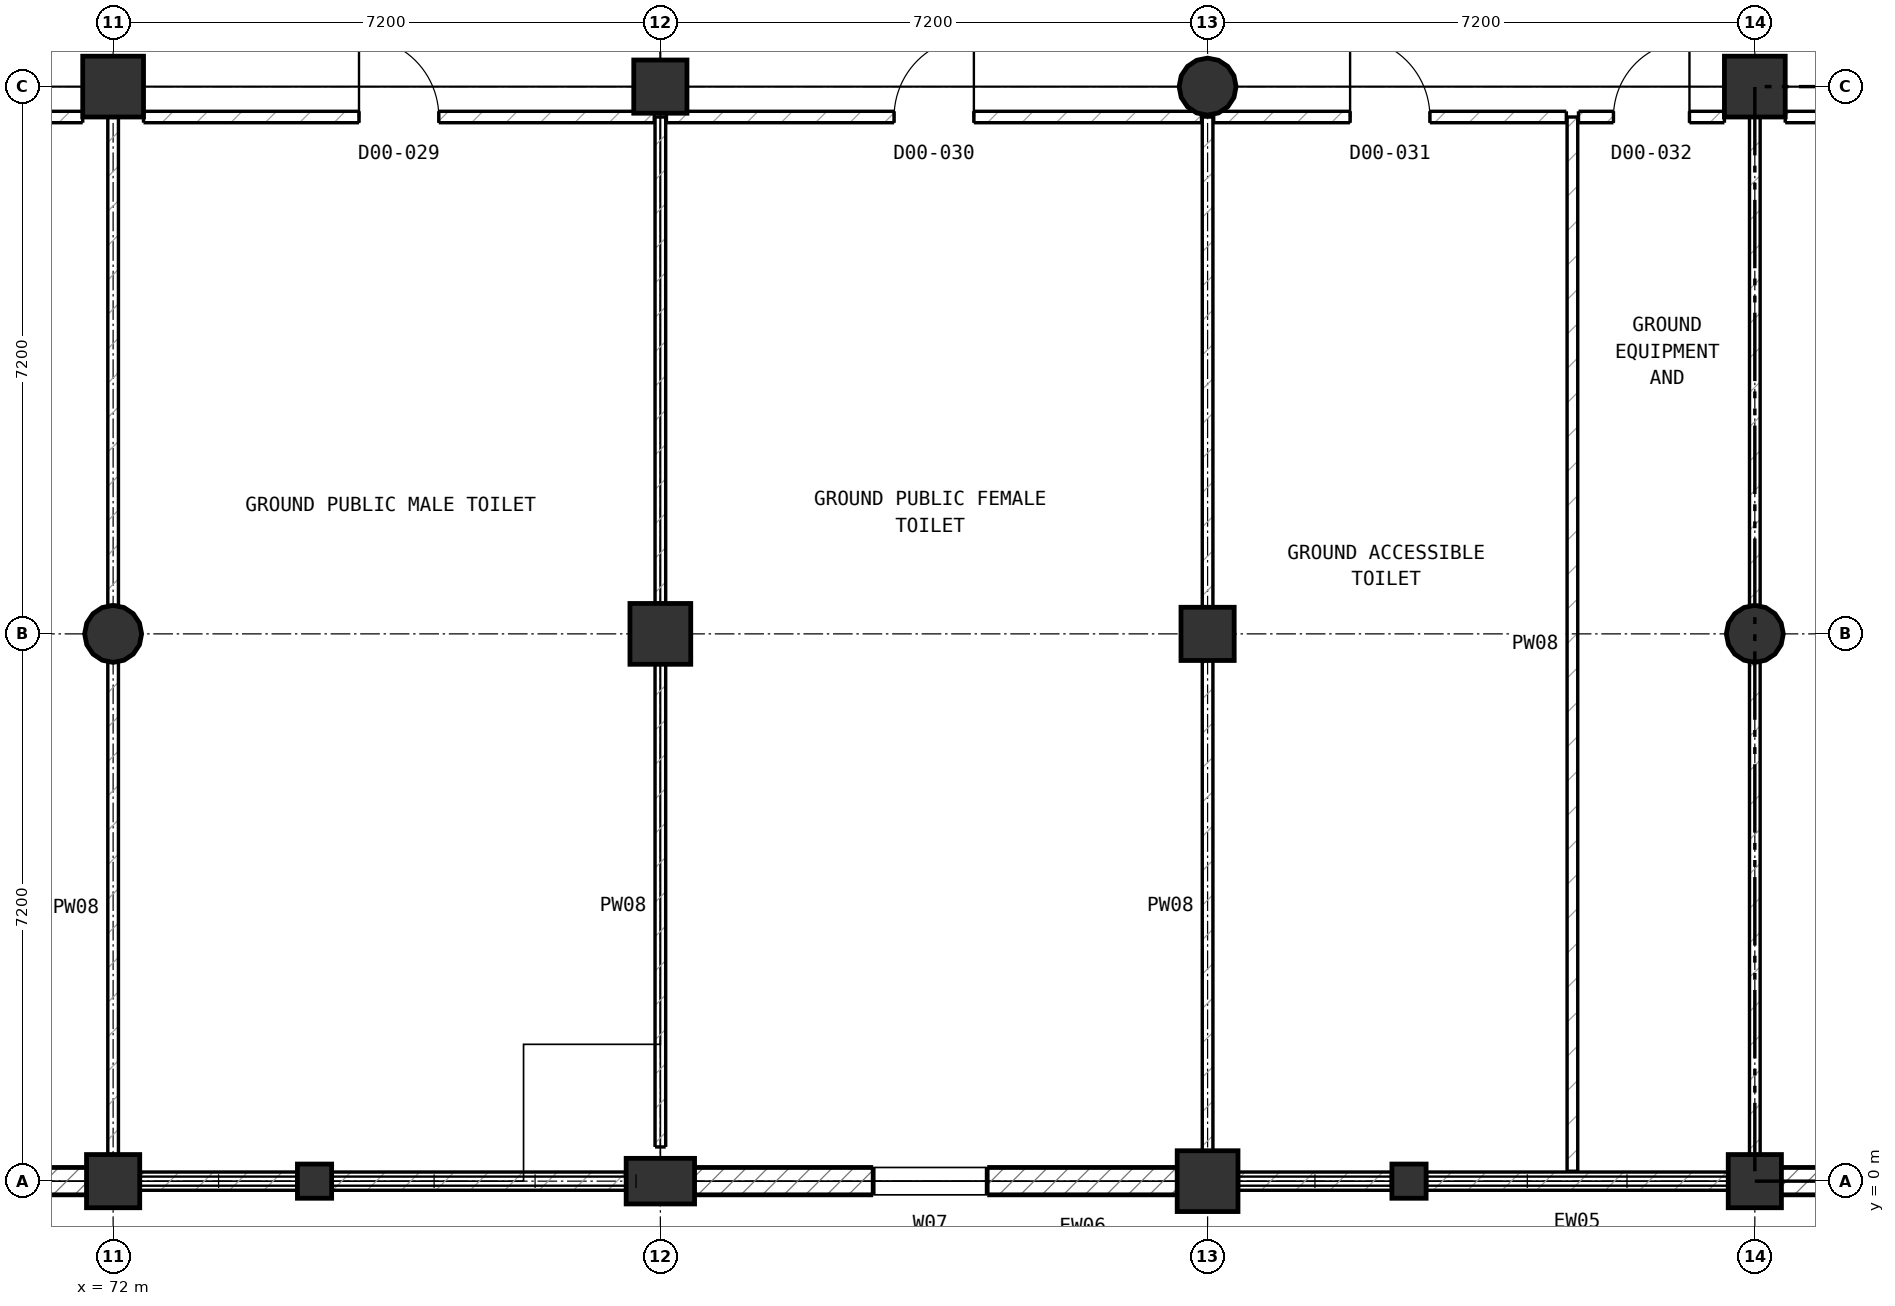
"""IFC4 building model, lengths in metres.
Left out: names, types, materials, properties, quantities, classifications, styles, units other than length and angle.
Written with IfcOpenShell. Run it as: python <this file> out.ifc"""

import sys

from ifc_helpers import new_model, si_unit, direction, frame, frame_2d, origin, origin_2d, place, context, subcontext, project, spatial, rectangle, circle, extrude, element, fill, save


model = new_model("IFC4")
c1 = context("Model", 3, precision=1e-05, world=origin(), true_north=direction((0.0, 1.0)))
c2 = subcontext(c1, "Body", "Model", "MODEL_VIEW")
j1 = project(units=[si_unit("LENGTHUNIT", "METRE"), si_unit("PLANEANGLEUNIT", "RADIAN")], contexts=[c1])
p1 = place(None, origin())
s1 = spatial("IfcSite", under=j1, at=p1, CompositionType="ELEMENT")
p2 = place(p1, origin())
s2 = spatial("IfcBuilding", under=s1, at=p2, CompositionType="ELEMENT")
p3 = place(p2, origin())
s3 = spatial("IfcBuildingStorey", under=s2, at=p3, CompositionType="ELEMENT", Elevation=0.0)
p4 = place(p3, frame((72.0, 0.0, 0.0), z_axis=(0.0, 0.0, 1.0), x_axis=(1.0, 0.0, 0.0)))
e1 = element("IfcColumn", 1, at=p4, inside=s3, PredefinedType="COLUMN", context=c2, shape_type="SweptSolid", body=[
    extrude(rectangle(XDim=0.7, YDim=0.7, at=origin_2d()), origin(), (0.0, 0.0, 1.0), 5.6),
])
p5 = place(p3, frame((72.0, 7.2, 0.0), z_axis=(0.0, 0.0, 1.0), x_axis=(1.0, 0.0, 0.0)))
e2 = element("IfcColumn", 2, at=p5, inside=s3, PredefinedType="COLUMN", context=c2, shape_type="SweptSolid", body=[
    extrude(circle(Radius=0.375, at=origin_2d()), origin(), (0.0, 0.0, 1.0), 5.6),
])
p6 = place(p3, frame((72.0, 14.4, 0.0), z_axis=(0.0, 0.0, 1.0), x_axis=(1.0, 0.0, 0.0)))
e3 = element("IfcColumn", 3, at=p6, inside=s3, PredefinedType="COLUMN", context=c2, shape_type="SweptSolid", body=[
    extrude(rectangle(XDim=0.8, YDim=0.8, at=origin_2d()), origin(), (0.0, 0.0, 1.0), 5.6),
])
p7 = place(p3, frame((79.2, 0.0, 0.0), z_axis=(0.0, 0.0, 1.0), x_axis=(1.0, 0.0, 0.0)))
e4 = element("IfcColumn", 4, at=p7, inside=s3, PredefinedType="COLUMN", context=c2, shape_type="SweptSolid", body=[
    extrude(rectangle(XDim=0.6, YDim=0.9, at=origin_2d()), origin(), (0.0, 0.0, 1.0), 5.6),
])
p8 = place(p3, frame((79.2, 7.2, 0.0), z_axis=(0.0, 0.0, 1.0), x_axis=(1.0, 0.0, 0.0)))
e5 = element("IfcColumn", 5, at=p8, inside=s3, PredefinedType="COLUMN", context=c2, shape_type="SweptSolid", body=[
    extrude(rectangle(XDim=0.8, YDim=0.8, at=origin_2d()), origin(), (0.0, 0.0, 1.0), 5.6),
])
p9 = place(p3, frame((79.2, 14.4, 0.0), z_axis=(0.0, 0.0, 1.0), x_axis=(1.0, 0.0, 0.0)))
e6 = element("IfcColumn", 6, at=p9, inside=s3, PredefinedType="COLUMN", context=c2, shape_type="SweptSolid", body=[
    extrude(rectangle(XDim=0.7, YDim=0.7, at=origin_2d()), origin(), (0.0, 0.0, 1.0), 5.6),
])
p10 = place(p3, frame((86.4, 0.0, 0.0), z_axis=(0.0, 0.0, 1.0), x_axis=(1.0, 0.0, 0.0)))
e7 = element("IfcColumn", 7, at=p10, inside=s3, PredefinedType="COLUMN", context=c2, shape_type="SweptSolid", body=[
    extrude(rectangle(XDim=0.8, YDim=0.8, at=origin_2d()), origin(), (0.0, 0.0, 1.0), 5.6),
])
p11 = place(p3, frame((86.4, 7.2, 0.0), z_axis=(0.0, 0.0, 1.0), x_axis=(1.0, 0.0, 0.0)))
e8 = element("IfcColumn", 8, at=p11, inside=s3, PredefinedType="COLUMN", context=c2, shape_type="SweptSolid", body=[
    extrude(rectangle(XDim=0.7, YDim=0.7, at=origin_2d()), origin(), (0.0, 0.0, 1.0), 5.6),
])
p12 = place(p3, frame((86.4, 14.4, 0.0), z_axis=(0.0, 0.0, 1.0), x_axis=(1.0, 0.0, 0.0)))
e9 = element("IfcColumn", 9, at=p12, inside=s3, PredefinedType="COLUMN", context=c2, shape_type="SweptSolid", body=[
    extrude(circle(Radius=0.375, at=origin_2d()), origin(), (0.0, 0.0, 1.0), 5.6),
])
p13 = place(p3, frame((93.6, 0.0, 0.0), z_axis=(0.0, 0.0, 1.0), x_axis=(1.0, 0.0, 0.0)))
e10 = element("IfcColumn", 10, at=p13, inside=s3, PredefinedType="COLUMN", context=c2, shape_type="SweptSolid", body=[
    extrude(rectangle(XDim=0.7, YDim=0.7, at=origin_2d()), origin(), (0.0, 0.0, 1.0), 5.6),
])
p14 = place(p3, frame((93.6, 7.2, 0.0), z_axis=(0.0, 0.0, 1.0), x_axis=(1.0, 0.0, 0.0)))
e11 = element("IfcColumn", 11, at=p14, inside=s3, PredefinedType="COLUMN", context=c2, shape_type="SweptSolid", body=[
    extrude(circle(Radius=0.375, at=origin_2d()), origin(), (0.0, 0.0, 1.0), 5.6),
])
p15 = place(p3, frame((93.6, 14.4, 0.0), z_axis=(0.0, 0.0, 1.0), x_axis=(1.0, 0.0, 0.0)))
e12 = element("IfcColumn", 12, at=p15, inside=s3, PredefinedType="COLUMN", context=c2, shape_type="SweptSolid", body=[
    extrude(rectangle(XDim=0.8, YDim=0.8, at=origin_2d()), origin(), (0.0, 0.0, 1.0), 5.6),
])
for number, where, z_axis, x_axis in (
    (13, (74.65, 0.0, 0.0), (0.0, 0.0, 1.0), (1.0, 0.0, 0.0)),
    (14, (89.05, 0.0, 0.0), (0.0, 0.0, 1.0), (1.0, 0.0, 0.0)),
):
    element("IfcColumn", number, at=place(p3, frame(where, z_axis=z_axis, x_axis=x_axis)), inside=s3, PredefinedType="PILASTER", context=c2, shape_type="SweptSolid", body=[
        extrude(rectangle(XDim=0.45, YDim=0.45, at=origin_2d()), origin(), (0.0, 0.0, 1.0), 5.6),
    ])
p16 = place(p3, frame((100.515, 0.0, 0.0), z_axis=(0.0, 0.0, 1.0), x_axis=(-1.0, 0.0, 0.0)))
e15 = element("IfcWall", 15, at=p16, inside=s3, PredefinedType="SOLIDWALL", context=c2, shape_type="SweptSolid", body=[
    extrude(rectangle(XDim=6.58, YDim=0.36, at=frame_2d((3.29, 0.0))), origin(), (0.0, 0.0, 1.0), 5.6),
])
p17 = place(p16, frame((2.315, 0.0, 0.0)))
e16 = element("IfcOpeningElement", 16, at=p17, cuts=e15, PredefinedType="OPENING", context=c2, shape_type="SweptSolid", body=[
    extrude(rectangle(XDim=1.95, YDim=2.2, at=frame_2d((0.975, 1.1))), frame((0.0, 0.19, 0.0), z_axis=(0.0, -1.0, 0.0), x_axis=(1.0, 0.0, 0.0)), (0.0, 0.0, 1.0), 0.38),
])
p18 = place(p3, frame((93.265, 0.0, 0.0), z_axis=(0.0, 0.0, 1.0), x_axis=(-1.0, 0.0, 0.0)))
e17 = element("IfcWall", 17, at=p18, inside=s3, PredefinedType="SOLIDWALL", context=c2, shape_type="SweptSolid", body=[
    extrude(rectangle(XDim=4.005, YDim=0.24, at=frame_2d((2.002, 0.0))), origin(), (0.0, 0.0, 1.0), 0.35),
])
p19 = place(p3, frame((88.84, 0.0, 0.0), z_axis=(0.0, 0.0, 1.0), x_axis=(-1.0, 0.0, 0.0)))
e18 = element("IfcWall", 18, at=p19, inside=s3, PredefinedType="SOLIDWALL", context=c2, shape_type="SweptSolid", body=[
    extrude(rectangle(XDim=2.055, YDim=0.24, at=frame_2d((1.028, 0.0))), origin(), (0.0, 0.0, 1.0), 0.35),
])
p20 = place(p3, frame((86.015, 0.0, 0.0), z_axis=(0.0, 0.0, 1.0), x_axis=(-1.0, 0.0, 0.0)))
e19 = element("IfcWall", 19, at=p20, inside=s3, PredefinedType="SOLIDWALL", context=c2, shape_type="SweptSolid", body=[
    extrude(rectangle(XDim=6.53, YDim=0.36, at=frame_2d((3.265, 0.0))), origin(), (0.0, 0.0, 1.0), 5.6),
])
p21 = place(p20, frame((2.515, 0.0, 0.9)))
e20 = element("IfcOpeningElement", 20, at=p21, cuts=e19, PredefinedType="OPENING", context=c2, shape_type="SweptSolid", body=[
    extrude(rectangle(XDim=1.5, YDim=2.7, at=frame_2d((0.75, 1.35))), frame((0.0, 0.19, 0.0), z_axis=(0.0, -1.0, 0.0), x_axis=(1.0, 0.0, 0.0)), (0.0, 0.0, 1.0), 0.38),
])
p22 = place(p3, frame((78.915, 0.0, 0.0), z_axis=(0.0, 0.0, 1.0), x_axis=(-1.0, 0.0, 0.0)))
e21 = element("IfcWall", 21, at=p22, inside=s3, PredefinedType="SOLIDWALL", context=c2, shape_type="SweptSolid", body=[
    extrude(rectangle(XDim=4.055, YDim=0.24, at=frame_2d((2.027, 0.0))), origin(), (0.0, 0.0, 1.0), 0.35),
])
p23 = place(p3, frame((74.44, 0.0, 0.0), z_axis=(0.0, 0.0, 1.0), x_axis=(-1.0, 0.0, 0.0)))
e22 = element("IfcWall", 22, at=p23, inside=s3, PredefinedType="SOLIDWALL", context=c2, shape_type="SweptSolid", body=[
    extrude(rectangle(XDim=2.105, YDim=0.24, at=frame_2d((1.052, 0.0))), origin(), (0.0, 0.0, 1.0), 0.35),
])
p24 = place(p3, frame((71.665, 0.0, 0.0), z_axis=(0.0, 0.0, 1.0), x_axis=(-1.0, 0.0, 0.0)))
e23 = element("IfcWall", 23, at=p24, inside=s3, PredefinedType="SOLIDWALL", context=c2, shape_type="SweptSolid", body=[
    extrude(rectangle(XDim=6.48, YDim=0.36, at=frame_2d((3.24, 0.0))), origin(), (0.0, 0.0, 1.0), 5.6),
])
p25 = place(p24, frame((2.24, 0.0, 2.1)))
e24 = element("IfcOpeningElement", 24, at=p25, cuts=e23, PredefinedType="OPENING", context=c2, shape_type="SweptSolid", body=[
    extrude(rectangle(XDim=2.0, YDim=0.9, at=frame_2d((1.0, 0.45))), frame((0.0, 0.19, 0.0), z_axis=(0.0, -1.0, 0.0), x_axis=(1.0, 0.0, 0.0)), (0.0, 0.0, 1.0), 0.38),
])
p26 = place(p3, frame((72.0, 0.35, 0.0), z_axis=(0.0, 0.0, 1.0), x_axis=(0.0, 1.0, 0.0)))
e25 = element("IfcWall", 25, at=p26, inside=s3, PredefinedType="PARTITIONING", context=c2, shape_type="SweptSolid", body=[
    extrude(rectangle(XDim=6.475, YDim=0.14, at=frame_2d((3.237, 0.0))), origin(), (0.0, 0.0, 1.0), 4.88),
])
p27 = place(p3, frame((72.0, 7.575, 0.0), z_axis=(0.0, 0.0, 1.0), x_axis=(0.0, 1.0, 0.0)))
e26 = element("IfcWall", 26, at=p27, inside=s3, PredefinedType="PARTITIONING", context=c2, shape_type="SweptSolid", body=[
    extrude(rectangle(XDim=6.425, YDim=0.14, at=frame_2d((3.212, 0.0))), origin(), (0.0, 0.0, 1.0), 4.88),
])
p28 = place(p3, frame((79.2, 0.45, 0.0), z_axis=(0.0, 0.0, 1.0), x_axis=(0.0, 1.0, 0.0)))
e27 = element("IfcWall", 27, at=p28, inside=s3, PredefinedType="PARTITIONING", context=c2, shape_type="SweptSolid", body=[
    extrude(rectangle(XDim=6.35, YDim=0.14, at=frame_2d((3.175, 0.0))), origin(), (0.0, 0.0, 1.0), 5.3),
])
p29 = place(p3, frame((79.2, 7.6, 0.0), z_axis=(0.0, 0.0, 1.0), x_axis=(0.0, 1.0, 0.0)))
e28 = element("IfcWall", 28, at=p29, inside=s3, PredefinedType="PARTITIONING", context=c2, shape_type="SweptSolid", body=[
    extrude(rectangle(XDim=6.4, YDim=0.14, at=frame_2d((3.2, 0.0))), origin(), (0.0, 0.0, 1.0), 5.3),
])
p30 = place(p3, frame((86.4, 0.4, 0.0), z_axis=(0.0, 0.0, 1.0), x_axis=(0.0, 1.0, 0.0)))
e29 = element("IfcWall", 29, at=p30, inside=s3, PredefinedType="PARTITIONING", context=c2, shape_type="SweptSolid", body=[
    extrude(rectangle(XDim=6.45, YDim=0.14, at=frame_2d((3.225, 0.0))), origin(), (0.0, 0.0, 1.0), 4.88),
])
p31 = place(p3, frame((86.4, 7.55, 0.0), z_axis=(0.0, 0.0, 1.0), x_axis=(0.0, 1.0, 0.0)))
e30 = element("IfcWall", 30, at=p31, inside=s3, PredefinedType="PARTITIONING", context=c2, shape_type="SweptSolid", body=[
    extrude(rectangle(XDim=6.45, YDim=0.14, at=frame_2d((3.225, 0.0))), origin(), (0.0, 0.0, 1.0), 4.88),
])
p32 = place(p3, frame((91.2, 0.13, 0.0), z_axis=(0.0, 0.0, 1.0), x_axis=(0.0, 1.0, 0.0)))
e31 = element("IfcWall", 31, at=p32, inside=s3, PredefinedType="PARTITIONING", context=c2, shape_type="SweptSolid", body=[
    extrude(rectangle(XDim=13.87, YDim=0.14, at=frame_2d((6.935, 0.0))), origin(), (0.0, 0.0, 1.0), 5.3),
])
p33 = place(p3, frame((93.6, 0.35, 0.0), z_axis=(0.0, 0.0, 1.0), x_axis=(0.0, 1.0, 0.0)))
e32 = element("IfcWall", 32, at=p33, inside=s3, PredefinedType="PARTITIONING", context=c2, shape_type="SweptSolid", body=[
    extrude(rectangle(XDim=6.475, YDim=0.14, at=frame_2d((3.237, 0.0))), origin(), (0.0, 0.0, 1.0), 4.88),
])
p34 = place(p3, frame((93.6, 7.575, 0.0), z_axis=(0.0, 0.0, 1.0), x_axis=(0.0, 1.0, 0.0)))
e33 = element("IfcWall", 33, at=p34, inside=s3, PredefinedType="PARTITIONING", context=c2, shape_type="SweptSolid", body=[
    extrude(rectangle(XDim=6.425, YDim=0.14, at=frame_2d((3.212, 0.0))), origin(), (0.0, 0.0, 1.0), 4.88),
])
p35 = place(p3, frame((64.875, 14.0, 0.0), z_axis=(0.0, 0.0, 1.0), x_axis=(1.0, 0.0, 0.0)))
e34 = element("IfcWall", 34, at=p35, inside=s3, PredefinedType="PARTITIONING", context=c2, shape_type="SweptSolid", body=[
    extrude(rectangle(XDim=6.725, YDim=0.15, at=frame_2d((3.363, 0.0))), origin(), (0.0, 0.0, 1.0), 5.3),
])
p36 = place(p35, frame((2.837, 0.0, 0.0)))
e35 = element("IfcOpeningElement", 35, at=p36, cuts=e34, PredefinedType="OPENING", context=c2, shape_type="SweptSolid", body=[
    extrude(rectangle(XDim=1.05, YDim=2.15, at=frame_2d((0.525, 1.075))), frame((0.0, 0.085, 0.0), z_axis=(0.0, -1.0, 0.0), x_axis=(1.0, 0.0, 0.0)), (0.0, 0.0, 1.0), 0.17),
])
p37 = place(p3, frame((72.4, 14.0, 0.0), z_axis=(0.0, 0.0, 1.0), x_axis=(1.0, 0.0, 0.0)))
e36 = element("IfcWall", 36, at=p37, inside=s3, PredefinedType="PARTITIONING", context=c2, shape_type="SweptSolid", body=[
    extrude(rectangle(XDim=6.72, YDim=0.15, at=frame_2d((3.36, 0.0))), origin(), (0.0, 0.0, 1.0), 5.3),
])
p38 = place(p37, frame((2.835, 0.0, 0.0)))
e37 = element("IfcOpeningElement", 37, at=p38, cuts=e36, PredefinedType="OPENING", context=c2, shape_type="SweptSolid", body=[
    extrude(rectangle(XDim=1.05, YDim=2.15, at=frame_2d((0.525, 1.075))), frame((0.0, 0.085, 0.0), z_axis=(0.0, -1.0, 0.0), x_axis=(1.0, 0.0, 0.0)), (0.0, 0.0, 1.0), 0.17),
])
p39 = place(p3, frame((79.28, 14.0, 0.0), z_axis=(0.0, 0.0, 1.0), x_axis=(1.0, 0.0, 0.0)))
e38 = element("IfcWall", 38, at=p39, inside=s3, PredefinedType="PARTITIONING", context=c2, shape_type="SweptSolid", body=[
    extrude(rectangle(XDim=7.04, YDim=0.15, at=frame_2d((3.52, 0.0))), origin(), (0.0, 0.0, 1.0), 5.3),
])
p40 = place(p39, frame((2.995, 0.0, 0.0)))
e39 = element("IfcOpeningElement", 39, at=p40, cuts=e38, PredefinedType="OPENING", context=c2, shape_type="SweptSolid", body=[
    extrude(rectangle(XDim=1.05, YDim=2.15, at=frame_2d((0.525, 1.075))), frame((0.0, 0.085, 0.0), z_axis=(0.0, -1.0, 0.0), x_axis=(1.0, 0.0, 0.0)), (0.0, 0.0, 1.0), 0.17),
])
p41 = place(p3, frame((86.48, 14.0, 0.0), z_axis=(0.0, 0.0, 1.0), x_axis=(1.0, 0.0, 0.0)))
e40 = element("IfcWall", 40, at=p41, inside=s3, PredefinedType="PARTITIONING", context=c2, shape_type="SweptSolid", body=[
    extrude(rectangle(XDim=4.64, YDim=0.15, at=frame_2d((2.32, 0.0))), origin(), (0.0, 0.0, 1.0), 5.3),
])
p42 = place(p41, frame((1.795, 0.0, 0.0)))
e41 = element("IfcOpeningElement", 41, at=p42, cuts=e40, PredefinedType="OPENING", context=c2, shape_type="SweptSolid", body=[
    extrude(rectangle(XDim=1.05, YDim=2.15, at=frame_2d((0.525, 1.075))), frame((0.0, 0.085, 0.0), z_axis=(0.0, -1.0, 0.0), x_axis=(1.0, 0.0, 0.0)), (0.0, 0.0, 1.0), 0.17),
])
p43 = place(p3, frame((91.28, 14.0, 0.0), z_axis=(0.0, 0.0, 1.0), x_axis=(1.0, 0.0, 0.0)))
e42 = element("IfcWall", 42, at=p43, inside=s3, PredefinedType="PARTITIONING", context=c2, shape_type="SweptSolid", body=[
    extrude(rectangle(XDim=1.92, YDim=0.15, at=frame_2d((0.96, 0.0))), origin(), (0.0, 0.0, 1.0), 5.3),
])
p44 = place(p43, frame((0.46, 0.0, 0.0)))
e43 = element("IfcOpeningElement", 43, at=p44, cuts=e42, PredefinedType="OPENING", context=c2, shape_type="SweptSolid", body=[
    extrude(rectangle(XDim=1.0, YDim=2.15, at=frame_2d((0.5, 1.075))), frame((0.0, 0.085, 0.0), z_axis=(0.0, -1.0, 0.0), x_axis=(1.0, 0.0, 0.0)), (0.0, 0.0, 1.0), 0.17),
])
p45 = place(p3, frame((94.0, 14.0, 0.0), z_axis=(0.0, 0.0, 1.0), x_axis=(1.0, 0.0, 0.0)))
e44 = element("IfcWall", 44, at=p45, inside=s3, PredefinedType="PARTITIONING", context=c2, shape_type="SweptSolid", body=[
    extrude(rectangle(XDim=10.325, YDim=0.15, at=frame_2d((5.163, 0.0))), origin(), (0.0, 0.0, 1.0), 5.3),
])
p46 = place(p45, frame((4.413, 0.0, 0.0)))
e45 = element("IfcOpeningElement", 45, at=p46, cuts=e44, PredefinedType="OPENING", context=c2, shape_type="SweptSolid", body=[
    extrude(rectangle(XDim=1.5, YDim=2.2, at=frame_2d((0.75, 1.1))), frame((0.0, 0.085, 0.0), z_axis=(0.0, -1.0, 0.0), x_axis=(1.0, 0.0, 0.0)), (0.0, 0.0, 1.0), 0.17),
])
p47 = place(p21, origin())
e46 = element("IfcWindow", 46, at=p47, inside=s3, PartitioningType="SINGLE_PANEL", PredefinedType="WINDOW", context=c2, shape_type="SweptSolid", body=[
    extrude(rectangle(XDim=1.5, YDim=2.7, at=frame_2d((0.75, 1.35))), frame((0.0, 0.03, 0.0), z_axis=(0.0, -1.0, 0.0), x_axis=(1.0, 0.0, 0.0)), (0.0, 0.0, 1.0), 0.06),
])
fill(e20, e46)
p48 = place(p38, origin())
e47 = element("IfcDoor", 47, at=p48, inside=s3, OperationType="SINGLE_SWING_LEFT", PredefinedType="DOOR", context=c2, shape_type="SweptSolid", body=[
    extrude(rectangle(XDim=1.05, YDim=2.15, at=frame_2d((0.525, 1.075))), frame((0.0, 0.025, 0.0), z_axis=(0.0, -1.0, 0.0), x_axis=(1.0, 0.0, 0.0)), (0.0, 0.0, 1.0), 0.05),
])
fill(e37, e47)
p49 = place(p40, origin())
e48 = element("IfcDoor", 48, at=p49, inside=s3, OperationType="SINGLE_SWING_RIGHT", PredefinedType="DOOR", context=c2, shape_type="SweptSolid", body=[
    extrude(rectangle(XDim=1.05, YDim=2.15, at=frame_2d((0.525, 1.075))), frame((0.0, 0.025, 0.0), z_axis=(0.0, -1.0, 0.0), x_axis=(1.0, 0.0, 0.0)), (0.0, 0.0, 1.0), 0.05),
])
fill(e39, e48)
p50 = place(p42, origin())
e49 = element("IfcDoor", 49, at=p50, inside=s3, OperationType="SINGLE_SWING_LEFT", PredefinedType="DOOR", context=c2, shape_type="SweptSolid", body=[
    extrude(rectangle(XDim=1.05, YDim=2.15, at=frame_2d((0.525, 1.075))), frame((0.0, 0.025, 0.0), z_axis=(0.0, -1.0, 0.0), x_axis=(1.0, 0.0, 0.0)), (0.0, 0.0, 1.0), 0.05),
])
fill(e41, e49)
p51 = place(p44, origin())
e50 = element("IfcDoor", 50, at=p51, inside=s3, OperationType="SINGLE_SWING_RIGHT", PredefinedType="DOOR", context=c2, shape_type="SweptSolid", body=[
    extrude(rectangle(XDim=1.0, YDim=2.15, at=frame_2d((0.5, 1.075))), frame((0.0, 0.025, 0.0), z_axis=(0.0, -1.0, 0.0), x_axis=(1.0, 0.0, 0.0)), (0.0, 0.0, 1.0), 0.05),
])
fill(e43, e50)
save(model, sys.argv[1])
